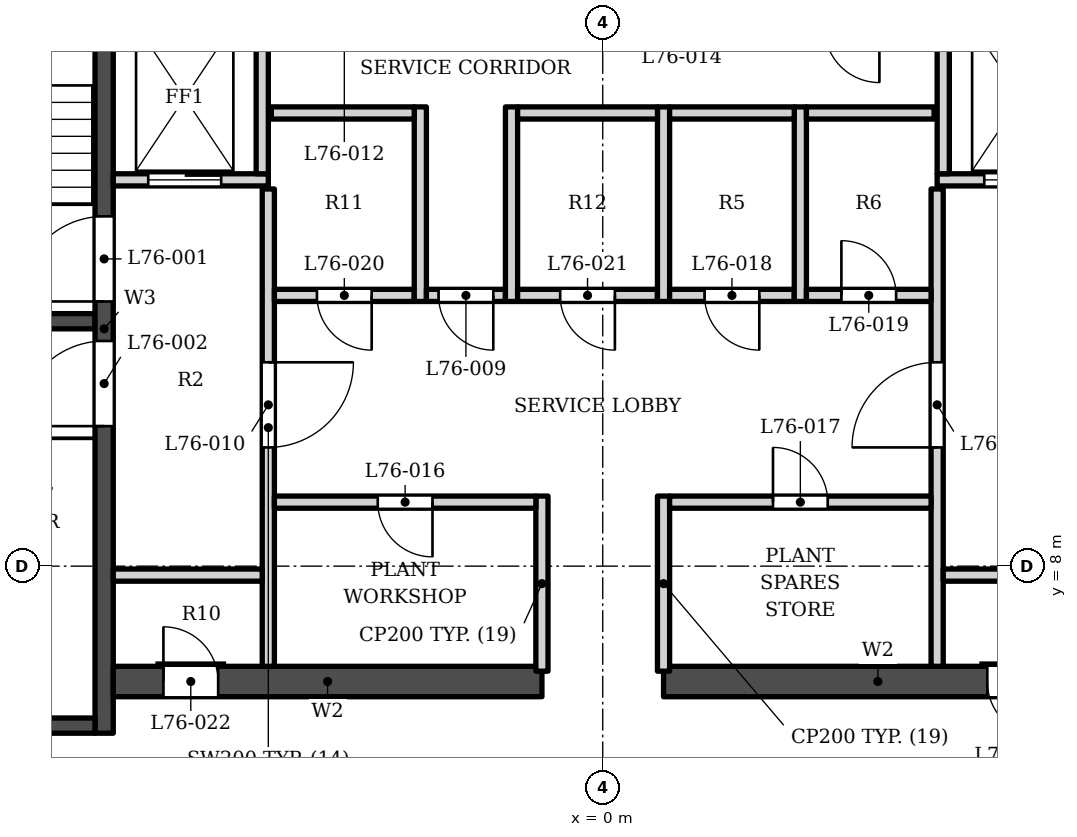
"""IFC4 building model, lengths in metres.
Left out: names, types, materials, properties, quantities, classifications, styles, units other than length and angle.
Written with IfcOpenShell. Run it as: python <this file> out.ifc"""

import sys

from ifc_helpers import new_model, si_unit, direction, frame, frame_2d, origin, place, context, subcontext, project, spatial, rectangle, extrude, element, fill, save


model = new_model("IFC4")
c1 = context("Model", 3, precision=1e-05, world=origin(), true_north=direction((0.0, 1.0)))
c2 = subcontext(c1, "Body", "Model", "MODEL_VIEW")
j1 = project(units=[si_unit("LENGTHUNIT", "METRE"), si_unit("PLANEANGLEUNIT", "RADIAN")], contexts=[c1])
p1 = place(None, origin())
s1 = spatial("IfcSite", under=j1, at=p1, CompositionType="ELEMENT")
p2 = place(p1, origin())
s2 = spatial("IfcBuilding", under=s1, at=p2, CompositionType="ELEMENT")
p3 = place(p2, frame((0.0, 0.0, 325.5)))
s3 = spatial("IfcBuildingStorey", under=s2, at=p3, CompositionType="ELEMENT", Elevation=325.5)
p4 = place(p3, frame((-8.2, 5.253, 0.0), z_axis=(0.0, 0.0, 1.0), x_axis=(0.0, 1.0, 0.0)))
e1 = element("IfcWall", 1, at=p4, inside=s3, PredefinedType="SHEAR", context=c2, shape_type="SweptSolid", body=[
    extrude(rectangle(XDim=13.3, YDim=0.3, at=frame_2d((6.65, 0.0))), origin(), (0.0, 0.0, 1.0), 5.0),
])
p5 = place(p4, frame((7.1, 0.0, 0.0)))
e2 = element("IfcOpeningElement", 2, at=p5, cuts=e1, PredefinedType="OPENING", context=c2, shape_type="SweptSolid", body=[
    extrude(rectangle(XDim=1.4, YDim=2.1, at=frame_2d((0.7, 1.05))), frame((0.0, 0.16, 0.0), z_axis=(0.0, -1.0, 0.0), x_axis=(1.0, 0.0, 0.0)), (0.0, 0.0, 1.0), 0.32),
])
p6 = place(p4, frame((5.05, 0.0, 0.0)))
e3 = element("IfcOpeningElement", 3, at=p6, cuts=e1, PredefinedType="OPENING", context=c2, shape_type="SweptSolid", body=[
    extrude(rectangle(XDim=1.4, YDim=2.1, at=frame_2d((0.7, 1.05))), frame((0.0, 0.16, 0.0), z_axis=(0.0, -1.0, 0.0), x_axis=(1.0, 0.0, 0.0)), (0.0, 0.0, 1.0), 0.32),
])
for number, where, z_axis, x_axis in (
    (4, (-12.1, 12.028, 0.0), (0.0, 0.0, 1.0), (1.0, 0.0, 0.0)),
    (5, (-12.1, 5.378, 0.0), (0.0, 0.0, 1.0), (1.0, 0.0, 0.0)),
):
    element("IfcWall", number, at=place(p3, frame(where, z_axis=z_axis, x_axis=x_axis)), inside=s3, PredefinedType="SHEAR", context=c2, shape_type="SweptSolid", body=[
        extrude(rectangle(XDim=3.75, YDim=0.25, at=frame_2d((1.875, 0.0))), origin(), (0.0, 0.0, 1.0), 5.0),
    ])
p7 = place(p3, frame((-8.05, 6.103, 0.0), z_axis=(0.0, 0.0, 1.0), x_axis=(1.0, 0.0, 0.0)))
e6 = element("IfcWall", 6, at=p7, inside=s3, PredefinedType="SHEAR", context=c2, shape_type="SweptSolid", body=[
    extrude(rectangle(XDim=7.05, YDim=0.5, at=frame_2d((3.525, 0.0))), origin(), (0.0, 0.0, 1.0), 5.0),
])
p8 = place(p7, frame((0.825, 0.0, 0.0)))
e7 = element("IfcOpeningElement", 7, at=p8, cuts=e6, PredefinedType="OPENING", context=c2, shape_type="SweptSolid", body=[
    extrude(rectangle(XDim=0.9, YDim=2.1, at=frame_2d((0.45, 1.05))), frame((0.0, 0.26, 0.0), z_axis=(0.0, -1.0, 0.0), x_axis=(1.0, 0.0, 0.0)), (0.0, 0.0, 1.0), 0.52),
])
p9 = place(p3, frame((1.0, 6.103, 0.0), z_axis=(0.0, 0.0, 1.0), x_axis=(1.0, 0.0, 0.0)))
e8 = element("IfcWall", 8, at=p9, inside=s3, PredefinedType="SHEAR", context=c2, shape_type="SweptSolid", body=[
    extrude(rectangle(XDim=7.05, YDim=0.5, at=frame_2d((3.525, 0.0))), origin(), (0.0, 0.0, 1.0), 5.0),
])
p10 = place(p9, frame((5.325, 0.0, 0.0)))
e9 = element("IfcOpeningElement", 9, at=p10, cuts=e8, PredefinedType="OPENING", context=c2, shape_type="SweptSolid", body=[
    extrude(rectangle(XDim=0.9, YDim=2.1, at=frame_2d((0.45, 1.05))), frame((0.0, 0.26, 0.0), z_axis=(0.0, -1.0, 0.0), x_axis=(1.0, 0.0, 0.0)), (0.0, 0.0, 1.0), 0.52),
])
for number, where, z_axis, x_axis in (
    (10, (-1.0, 6.273, 0.0), (0.0, 0.0, 1.0), (0.0, 1.0, 0.0)),
    (11, (1.0, 6.273, 0.0), (0.0, 0.0, 1.0), (0.0, 1.0, 0.0)),
):
    element("IfcWall", number, at=place(p3, frame(where, z_axis=z_axis, x_axis=x_axis)), inside=s3, PredefinedType="PARTITIONING", context=c2, shape_type="SweptSolid", body=[
        extrude(rectangle(XDim=2.88, YDim=0.2, at=frame_2d((1.44, 0.0))), origin(), (0.0, 0.0, 1.0), 4.8),
    ])
p11 = place(p3, frame((-5.5, 6.353, 0.0), z_axis=(0.0, 0.0, 1.0), x_axis=(0.0, 1.0, 0.0)))
e12 = element("IfcWall", 12, at=p11, inside=s3, PredefinedType="SOLIDWALL", context=c2, shape_type="SweptSolid", body=[
    extrude(rectangle(XDim=7.85, YDim=0.2, at=frame_2d((3.925, 0.0))), origin(), (0.0, 0.0, 1.0), 4.8),
])
p12 = place(p11, frame((3.6, 0.0, 0.0)))
e13 = element("IfcOpeningElement", 13, at=p12, cuts=e12, PredefinedType="OPENING", context=c2, shape_type="SweptSolid", body=[
    extrude(rectangle(XDim=1.4, YDim=2.1, at=frame_2d((0.7, 1.05))), frame((0.0, 0.11, 0.0), z_axis=(0.0, -1.0, 0.0), x_axis=(1.0, 0.0, 0.0)), (0.0, 0.0, 1.0), 0.22),
])
p13 = place(p3, frame((5.5, 6.353, 0.0), z_axis=(0.0, 0.0, 1.0), x_axis=(0.0, 1.0, 0.0)))
e14 = element("IfcWall", 14, at=p13, inside=s3, PredefinedType="SOLIDWALL", context=c2, shape_type="SweptSolid", body=[
    extrude(rectangle(XDim=7.85, YDim=0.2, at=frame_2d((3.925, 0.0))), origin(), (0.0, 0.0, 1.0), 4.8),
])
p14 = place(p13, frame((3.6, 0.0, 0.0)))
e15 = element("IfcOpeningElement", 15, at=p14, cuts=e14, PredefinedType="OPENING", context=c2, shape_type="SweptSolid", body=[
    extrude(rectangle(XDim=1.4, YDim=2.1, at=frame_2d((0.7, 1.05))), frame((0.0, 0.11, 0.0), z_axis=(0.0, -1.0, 0.0), x_axis=(1.0, 0.0, 0.0)), (0.0, 0.0, 1.0), 0.22),
])
for number, where, z_axis, x_axis in (
    (16, (-8.05, 7.853, 0.0), (0.0, 0.0, 1.0), (1.0, 0.0, 0.0)),
    (17, (5.6, 7.853, 0.0), (0.0, 0.0, 1.0), (1.0, 0.0, 0.0)),
):
    element("IfcWall", number, at=place(p3, frame(where, z_axis=z_axis, x_axis=x_axis)), inside=s3, PredefinedType="SOLIDWALL", context=c2, shape_type="SweptSolid", body=[
        extrude(rectangle(XDim=2.45, YDim=0.2, at=frame_2d((1.225, 0.0))), origin(), (0.0, 0.0, 1.0), 4.8),
    ])
p15 = place(p3, frame((-5.4, 9.052, 0.0), z_axis=(0.0, 0.0, 1.0), x_axis=(1.0, 0.0, 0.0)))
e18 = element("IfcWall", 18, at=p15, inside=s3, PredefinedType="PARTITIONING", context=c2, shape_type="SweptSolid", body=[
    extrude(rectangle(XDim=4.3, YDim=0.2, at=frame_2d((2.15, 0.0))), origin(), (0.0, 0.0, 1.0), 4.8),
])
p16 = place(p15, frame((1.7, 0.0, 0.0)))
e19 = element("IfcOpeningElement", 19, at=p16, cuts=e18, PredefinedType="OPENING", context=c2, shape_type="SweptSolid", body=[
    extrude(rectangle(XDim=0.9, YDim=2.1, at=frame_2d((0.45, 1.05))), frame((0.0, 0.11, 0.0), z_axis=(0.0, -1.0, 0.0), x_axis=(1.0, 0.0, 0.0)), (0.0, 0.0, 1.0), 0.22),
])
p17 = place(p3, frame((1.1, 9.052, 0.0), z_axis=(0.0, 0.0, 1.0), x_axis=(1.0, 0.0, 0.0)))
e20 = element("IfcWall", 20, at=p17, inside=s3, PredefinedType="PARTITIONING", context=c2, shape_type="SweptSolid", body=[
    extrude(rectangle(XDim=4.3, YDim=0.2, at=frame_2d((2.15, 0.0))), origin(), (0.0, 0.0, 1.0), 4.8),
])
p18 = place(p17, frame((1.7, 0.0, 0.0)))
e21 = element("IfcOpeningElement", 21, at=p18, cuts=e20, PredefinedType="OPENING", context=c2, shape_type="SweptSolid", body=[
    extrude(rectangle(XDim=0.9, YDim=2.1, at=frame_2d((0.45, 1.05))), frame((0.0, 0.11, 0.0), z_axis=(0.0, -1.0, 0.0), x_axis=(1.0, 0.0, 0.0)), (0.0, 0.0, 1.0), 0.22),
])
p19 = place(p3, frame((-5.4, 12.453, 0.0), z_axis=(0.0, 0.0, 1.0), x_axis=(1.0, 0.0, 0.0)))
e22 = element("IfcWall", 22, at=p19, inside=s3, PredefinedType="PARTITIONING", context=c2, shape_type="SweptSolid", body=[
    extrude(rectangle(XDim=2.3, YDim=0.2, at=frame_2d((1.15, 0.0))), origin(), (0.0, 0.0, 1.0), 4.8),
])
p20 = place(p19, frame((0.7, 0.0, 0.0)))
e23 = element("IfcOpeningElement", 23, at=p20, cuts=e22, PredefinedType="OPENING", context=c2, shape_type="SweptSolid", body=[
    extrude(rectangle(XDim=0.9, YDim=2.1, at=frame_2d((0.45, 1.05))), frame((0.0, 0.11, 0.0), z_axis=(0.0, -1.0, 0.0), x_axis=(1.0, 0.0, 0.0)), (0.0, 0.0, 1.0), 0.22),
])
p21 = place(p3, frame((-3.0, 12.353, 0.0), z_axis=(0.0, 0.0, 1.0), x_axis=(0.0, 1.0, 0.0)))
e24 = element("IfcWall", 24, at=p21, inside=s3, PredefinedType="PARTITIONING", context=c2, shape_type="SweptSolid", body=[
    extrude(rectangle(XDim=3.2, YDim=0.2, at=frame_2d((1.6, 0.0))), origin(), (0.0, 0.0, 1.0), 4.8),
])
p22 = place(p3, frame((-2.9, 12.453, 0.0), z_axis=(0.0, 0.0, 1.0), x_axis=(1.0, 0.0, 0.0)))
e25 = element("IfcWall", 25, at=p22, inside=s3, PredefinedType="PARTITIONING", context=c2, shape_type="SweptSolid", body=[
    extrude(rectangle(XDim=1.3, YDim=0.2, at=frame_2d((0.65, 0.0))), origin(), (0.0, 0.0, 1.0), 4.8),
])
p23 = place(p22, frame((0.2, 0.0, 0.0)))
e26 = element("IfcOpeningElement", 26, at=p23, cuts=e25, PredefinedType="OPENING", context=c2, shape_type="SweptSolid", body=[
    extrude(rectangle(XDim=0.9, YDim=2.1, at=frame_2d((0.45, 1.05))), frame((0.0, 0.11, 0.0), z_axis=(0.0, -1.0, 0.0), x_axis=(1.0, 0.0, 0.0)), (0.0, 0.0, 1.0), 0.22),
])
p24 = place(p3, frame((-1.5, 12.353, 0.0), z_axis=(0.0, 0.0, 1.0), x_axis=(0.0, 1.0, 0.0)))
e27 = element("IfcWall", 27, at=p24, inside=s3, PredefinedType="PARTITIONING", context=c2, shape_type="SweptSolid", body=[
    extrude(rectangle(XDim=3.2, YDim=0.2, at=frame_2d((1.6, 0.0))), origin(), (0.0, 0.0, 1.0), 4.8),
])
p25 = place(p3, frame((-1.4, 12.453, 0.0), z_axis=(0.0, 0.0, 1.0), x_axis=(1.0, 0.0, 0.0)))
e28 = element("IfcWall", 28, at=p25, inside=s3, PredefinedType="PARTITIONING", context=c2, shape_type="SweptSolid", body=[
    extrude(rectangle(XDim=2.3, YDim=0.2, at=frame_2d((1.15, 0.0))), origin(), (0.0, 0.0, 1.0), 4.8),
])
p26 = place(p25, frame((0.7, 0.0, 0.0)))
e29 = element("IfcOpeningElement", 29, at=p26, cuts=e28, PredefinedType="OPENING", context=c2, shape_type="SweptSolid", body=[
    extrude(rectangle(XDim=0.9, YDim=2.1, at=frame_2d((0.45, 1.05))), frame((0.0, 0.11, 0.0), z_axis=(0.0, -1.0, 0.0), x_axis=(1.0, 0.0, 0.0)), (0.0, 0.0, 1.0), 0.22),
])
p27 = place(p3, frame((1.0, 12.353, 0.0), z_axis=(0.0, 0.0, 1.0), x_axis=(0.0, 1.0, 0.0)))
e30 = element("IfcWall", 30, at=p27, inside=s3, PredefinedType="PARTITIONING", context=c2, shape_type="SweptSolid", body=[
    extrude(rectangle(XDim=3.2, YDim=0.2, at=frame_2d((1.6, 0.0))), origin(), (0.0, 0.0, 1.0), 4.8),
])
p28 = place(p3, frame((1.1, 12.453, 0.0), z_axis=(0.0, 0.0, 1.0), x_axis=(1.0, 0.0, 0.0)))
e31 = element("IfcWall", 31, at=p28, inside=s3, PredefinedType="PARTITIONING", context=c2, shape_type="SweptSolid", body=[
    extrude(rectangle(XDim=2.05, YDim=0.2, at=frame_2d((1.025, 0.0))), origin(), (0.0, 0.0, 1.0), 4.8),
])
p29 = place(p28, frame((0.575, 0.0, 0.0)))
e32 = element("IfcOpeningElement", 32, at=p29, cuts=e31, PredefinedType="OPENING", context=c2, shape_type="SweptSolid", body=[
    extrude(rectangle(XDim=0.9, YDim=2.1, at=frame_2d((0.45, 1.05))), frame((0.0, 0.11, 0.0), z_axis=(0.0, -1.0, 0.0), x_axis=(1.0, 0.0, 0.0)), (0.0, 0.0, 1.0), 0.22),
])
p30 = place(p3, frame((3.25, 12.353, 0.0), z_axis=(0.0, 0.0, 1.0), x_axis=(0.0, 1.0, 0.0)))
e33 = element("IfcWall", 33, at=p30, inside=s3, PredefinedType="PARTITIONING", context=c2, shape_type="SweptSolid", body=[
    extrude(rectangle(XDim=3.2, YDim=0.2, at=frame_2d((1.6, 0.0))), origin(), (0.0, 0.0, 1.0), 4.8),
])
p31 = place(p3, frame((3.35, 12.453, 0.0), z_axis=(0.0, 0.0, 1.0), x_axis=(1.0, 0.0, 0.0)))
e34 = element("IfcWall", 34, at=p31, inside=s3, PredefinedType="PARTITIONING", context=c2, shape_type="SweptSolid", body=[
    extrude(rectangle(XDim=2.05, YDim=0.2, at=frame_2d((1.025, 0.0))), origin(), (0.0, 0.0, 1.0), 4.8),
])
p32 = place(p31, frame((0.575, 0.0, 0.0)))
e35 = element("IfcOpeningElement", 35, at=p32, cuts=e34, PredefinedType="OPENING", context=c2, shape_type="SweptSolid", body=[
    extrude(rectangle(XDim=0.9, YDim=2.1, at=frame_2d((0.45, 1.05))), frame((0.0, 0.11, 0.0), z_axis=(0.0, -1.0, 0.0), x_axis=(1.0, 0.0, 0.0)), (0.0, 0.0, 1.0), 0.22),
])
p33 = place(p3, frame((-8.05, 14.353, 0.0), z_axis=(0.0, 0.0, 1.0), x_axis=(1.0, 0.0, 0.0)))
e36 = element("IfcWall", 36, at=p33, inside=s3, PredefinedType="SOLIDWALL", context=c2, shape_type="SweptSolid", body=[
    extrude(rectangle(XDim=2.55, YDim=0.2, at=frame_2d((1.275, 0.0))), origin(), (0.0, 0.0, 1.0), 4.8),
])
p34 = place(p33, frame((0.575, 0.0, 0.0)))
e37 = element("IfcOpeningElement", 37, at=p34, cuts=e36, PredefinedType="OPENING", context=c2, shape_type="SweptSolid", body=[
    extrude(rectangle(XDim=1.2, YDim=2.1, at=frame_2d((0.6, 1.05))), frame((0.0, 0.11, 0.0), z_axis=(0.0, -1.0, 0.0), x_axis=(1.0, 0.0, 0.0)), (0.0, 0.0, 1.0), 0.22),
])
p35 = place(p3, frame((5.5, 14.353, 0.0), z_axis=(0.0, 0.0, 1.0), x_axis=(1.0, 0.0, 0.0)))
e38 = element("IfcWall", 38, at=p35, inside=s3, PredefinedType="SOLIDWALL", context=c2, shape_type="SweptSolid", body=[
    extrude(rectangle(XDim=2.55, YDim=0.2, at=frame_2d((1.275, 0.0))), origin(), (0.0, 0.0, 1.0), 4.8),
])
p36 = place(p35, frame((0.775, 0.0, 0.0)))
e39 = element("IfcOpeningElement", 39, at=p36, cuts=e38, PredefinedType="OPENING", context=c2, shape_type="SweptSolid", body=[
    extrude(rectangle(XDim=1.2, YDim=2.1, at=frame_2d((0.6, 1.05))), frame((0.0, 0.11, 0.0), z_axis=(0.0, -1.0, 0.0), x_axis=(1.0, 0.0, 0.0)), (0.0, 0.0, 1.0), 0.22),
])
for number, where, z_axis, x_axis in (
    (40, (-5.6, 14.453, 0.0), (0.0, 0.0, 1.0), (0.0, 1.0, 0.0)),
    (41, (5.6, 14.453, 0.0), (0.0, 0.0, 1.0), (0.0, 1.0, 0.0)),
):
    element("IfcWall", number, at=place(p3, frame(where, z_axis=z_axis, x_axis=x_axis)), inside=s3, PredefinedType="SOLIDWALL", context=c2, shape_type="SweptSolid", body=[
        extrude(rectangle(XDim=3.9, YDim=0.2, at=frame_2d((1.95, 0.0))), origin(), (0.0, 0.0, 1.0), 4.8),
    ])
p37 = place(p3, frame((-5.45, 15.453, 0.0), z_axis=(0.0, 0.0, 1.0), x_axis=(1.0, 0.0, 0.0)))
e42 = element("IfcWall", 42, at=p37, inside=s3, PredefinedType="SOLIDWALL", context=c2, shape_type="SweptSolid", body=[
    extrude(rectangle(XDim=2.35, YDim=0.2, at=frame_2d((1.175, 0.0))), origin(), (0.0, 0.0, 1.0), 4.8),
])
p38 = place(p3, frame((-1.4, 15.453, 0.0), z_axis=(0.0, 0.0, 1.0), x_axis=(1.0, 0.0, 0.0)))
e43 = element("IfcWall", 43, at=p38, inside=s3, PredefinedType="PARTITIONING", context=c2, shape_type="SweptSolid", body=[
    extrude(rectangle(XDim=2.3, YDim=0.2, at=frame_2d((1.15, 0.0))), origin(), (0.0, 0.0, 1.0), 4.8),
])
p39 = place(p3, frame((1.1, 15.453, 0.0), z_axis=(0.0, 0.0, 1.0), x_axis=(1.0, 0.0, 0.0)))
e44 = element("IfcWall", 44, at=p39, inside=s3, PredefinedType="PARTITIONING", context=c2, shape_type="SweptSolid", body=[
    extrude(rectangle(XDim=2.05, YDim=0.2, at=frame_2d((1.025, 0.0))), origin(), (0.0, 0.0, 1.0), 4.8),
])
p40 = place(p3, frame((3.35, 15.453, 0.0), z_axis=(0.0, 0.0, 1.0), x_axis=(1.0, 0.0, 0.0)))
e45 = element("IfcWall", 45, at=p40, inside=s3, PredefinedType="SOLIDWALL", context=c2, shape_type="SweptSolid", body=[
    extrude(rectangle(XDim=2.1, YDim=0.2, at=frame_2d((1.05, 0.0))), origin(), (0.0, 0.0, 1.0), 4.8),
])
p41 = place(p34, origin())
e46 = element("IfcDoor", 46, at=p41, inside=s3, OperationType="DOUBLE_DOOR_SLIDING", PredefinedType="DOOR", context=c2, shape_type="SweptSolid", body=[
    extrude(rectangle(XDim=1.2, YDim=2.1, at=frame_2d((0.6, 1.05))), frame((0.0, 0.025, 0.0), z_axis=(0.0, -1.0, 0.0), x_axis=(1.0, 0.0, 0.0)), (0.0, 0.0, 1.0), 0.05),
])
fill(e37, e46)
p42 = place(p36, origin())
e47 = element("IfcDoor", 47, at=p42, inside=s3, OperationType="DOUBLE_DOOR_SLIDING", PredefinedType="DOOR", context=c2, shape_type="SweptSolid", body=[
    extrude(rectangle(XDim=1.2, YDim=2.1, at=frame_2d((0.6, 1.05))), frame((0.0, 0.025, 0.0), z_axis=(0.0, -1.0, 0.0), x_axis=(1.0, 0.0, 0.0)), (0.0, 0.0, 1.0), 0.05),
])
fill(e39, e47)
p43 = place(p5, origin())
e48 = element("IfcDoor", 48, at=p43, inside=s3, OperationType="SINGLE_SWING_LEFT", PredefinedType="DOOR", context=c2, shape_type="SweptSolid", body=[
    extrude(rectangle(XDim=1.4, YDim=2.1, at=frame_2d((0.7, 1.05))), frame((0.0, 0.025, 0.0), z_axis=(0.0, -1.0, 0.0), x_axis=(1.0, 0.0, 0.0)), (0.0, 0.0, 1.0), 0.05),
])
fill(e2, e48)
p44 = place(p6, origin())
e49 = element("IfcDoor", 49, at=p44, inside=s3, OperationType="SINGLE_SWING_LEFT", PredefinedType="DOOR", context=c2, shape_type="SweptSolid", body=[
    extrude(rectangle(XDim=1.4, YDim=2.1, at=frame_2d((0.7, 1.05))), frame((0.0, 0.025, 0.0), z_axis=(0.0, -1.0, 0.0), x_axis=(1.0, 0.0, 0.0)), (0.0, 0.0, 1.0), 0.05),
])
fill(e3, e49)
p45 = place(p23, origin())
e50 = element("IfcDoor", 50, at=p45, inside=s3, OperationType="SINGLE_SWING_RIGHT", PredefinedType="DOOR", context=c2, shape_type="SweptSolid", body=[
    extrude(rectangle(XDim=0.9, YDim=2.1, at=frame_2d((0.45, 1.05))), frame((0.0, 0.025, 0.0), z_axis=(0.0, -1.0, 0.0), x_axis=(1.0, 0.0, 0.0)), (0.0, 0.0, 1.0), 0.05),
])
fill(e26, e50)
p46 = place(p12, origin())
e51 = element("IfcDoor", 51, at=p46, inside=s3, OperationType="SINGLE_SWING_RIGHT", PredefinedType="DOOR", context=c2, shape_type="SweptSolid", body=[
    extrude(rectangle(XDim=1.4, YDim=2.1, at=frame_2d((0.7, 1.05))), frame((0.0, 0.025, 0.0), z_axis=(0.0, -1.0, 0.0), x_axis=(1.0, 0.0, 0.0)), (0.0, 0.0, 1.0), 0.05),
])
fill(e13, e51)
p47 = place(p14, origin())
e52 = element("IfcDoor", 52, at=p47, inside=s3, OperationType="SINGLE_SWING_LEFT", PredefinedType="DOOR", context=c2, shape_type="SweptSolid", body=[
    extrude(rectangle(XDim=1.4, YDim=2.1, at=frame_2d((0.7, 1.05))), frame((0.0, 0.025, 0.0), z_axis=(0.0, -1.0, 0.0), x_axis=(1.0, 0.0, 0.0)), (0.0, 0.0, 1.0), 0.05),
])
fill(e15, e52)
p48 = place(p16, origin())
e53 = element("IfcDoor", 53, at=p48, inside=s3, OperationType="SINGLE_SWING_RIGHT", PredefinedType="DOOR", context=c2, shape_type="SweptSolid", body=[
    extrude(rectangle(XDim=0.9, YDim=2.1, at=frame_2d((0.45, 1.05))), frame((0.0, 0.025, 0.0), z_axis=(0.0, -1.0, 0.0), x_axis=(1.0, 0.0, 0.0)), (0.0, 0.0, 1.0), 0.05),
])
fill(e19, e53)
p49 = place(p18, origin())
e54 = element("IfcDoor", 54, at=p49, inside=s3, OperationType="SINGLE_SWING_LEFT", PredefinedType="DOOR", context=c2, shape_type="SweptSolid", body=[
    extrude(rectangle(XDim=0.9, YDim=2.1, at=frame_2d((0.45, 1.05))), frame((0.0, 0.025, 0.0), z_axis=(0.0, -1.0, 0.0), x_axis=(1.0, 0.0, 0.0)), (0.0, 0.0, 1.0), 0.05),
])
fill(e21, e54)
p50 = place(p29, origin())
e55 = element("IfcDoor", 55, at=p50, inside=s3, OperationType="SINGLE_SWING_RIGHT", PredefinedType="DOOR", context=c2, shape_type="SweptSolid", body=[
    extrude(rectangle(XDim=0.9, YDim=2.1, at=frame_2d((0.45, 1.05))), frame((0.0, 0.025, 0.0), z_axis=(0.0, -1.0, 0.0), x_axis=(1.0, 0.0, 0.0)), (0.0, 0.0, 1.0), 0.05),
])
fill(e32, e55)
p51 = place(p32, origin())
e56 = element("IfcDoor", 56, at=p51, inside=s3, OperationType="SINGLE_SWING_LEFT", PredefinedType="DOOR", context=c2, shape_type="SweptSolid", body=[
    extrude(rectangle(XDim=0.9, YDim=2.1, at=frame_2d((0.45, 1.05))), frame((0.0, 0.025, 0.0), z_axis=(0.0, -1.0, 0.0), x_axis=(1.0, 0.0, 0.0)), (0.0, 0.0, 1.0), 0.05),
])
fill(e35, e56)
p52 = place(p20, origin())
e57 = element("IfcDoor", 57, at=p52, inside=s3, OperationType="SINGLE_SWING_RIGHT", PredefinedType="DOOR", context=c2, shape_type="SweptSolid", body=[
    extrude(rectangle(XDim=0.9, YDim=2.1, at=frame_2d((0.45, 1.05))), frame((0.0, 0.025, 0.0), z_axis=(0.0, -1.0, 0.0), x_axis=(1.0, 0.0, 0.0)), (0.0, 0.0, 1.0), 0.05),
])
fill(e23, e57)
p53 = place(p26, origin())
e58 = element("IfcDoor", 58, at=p53, inside=s3, OperationType="SINGLE_SWING_RIGHT", PredefinedType="DOOR", context=c2, shape_type="SweptSolid", body=[
    extrude(rectangle(XDim=0.9, YDim=2.1, at=frame_2d((0.45, 1.05))), frame((0.0, 0.025, 0.0), z_axis=(0.0, -1.0, 0.0), x_axis=(1.0, 0.0, 0.0)), (0.0, 0.0, 1.0), 0.05),
])
fill(e29, e58)
p54 = place(p8, origin())
e59 = element("IfcDoor", 59, at=p54, inside=s3, OperationType="SINGLE_SWING_LEFT", PredefinedType="DOOR", context=c2, shape_type="SweptSolid", body=[
    extrude(rectangle(XDim=0.9, YDim=2.1, at=frame_2d((0.45, 1.05))), frame((0.0, 0.025, 0.0), z_axis=(0.0, -1.0, 0.0), x_axis=(1.0, 0.0, 0.0)), (0.0, 0.0, 1.0), 0.05),
])
fill(e7, e59)
p55 = place(p10, origin())
e60 = element("IfcDoor", 60, at=p55, inside=s3, OperationType="SINGLE_SWING_RIGHT", PredefinedType="DOOR", context=c2, shape_type="SweptSolid", body=[
    extrude(rectangle(XDim=0.9, YDim=2.1, at=frame_2d((0.45, 1.05))), frame((0.0, 0.025, 0.0), z_axis=(0.0, -1.0, 0.0), x_axis=(1.0, 0.0, 0.0)), (0.0, 0.0, 1.0), 0.05),
])
fill(e9, e60)
save(model, sys.argv[1])
